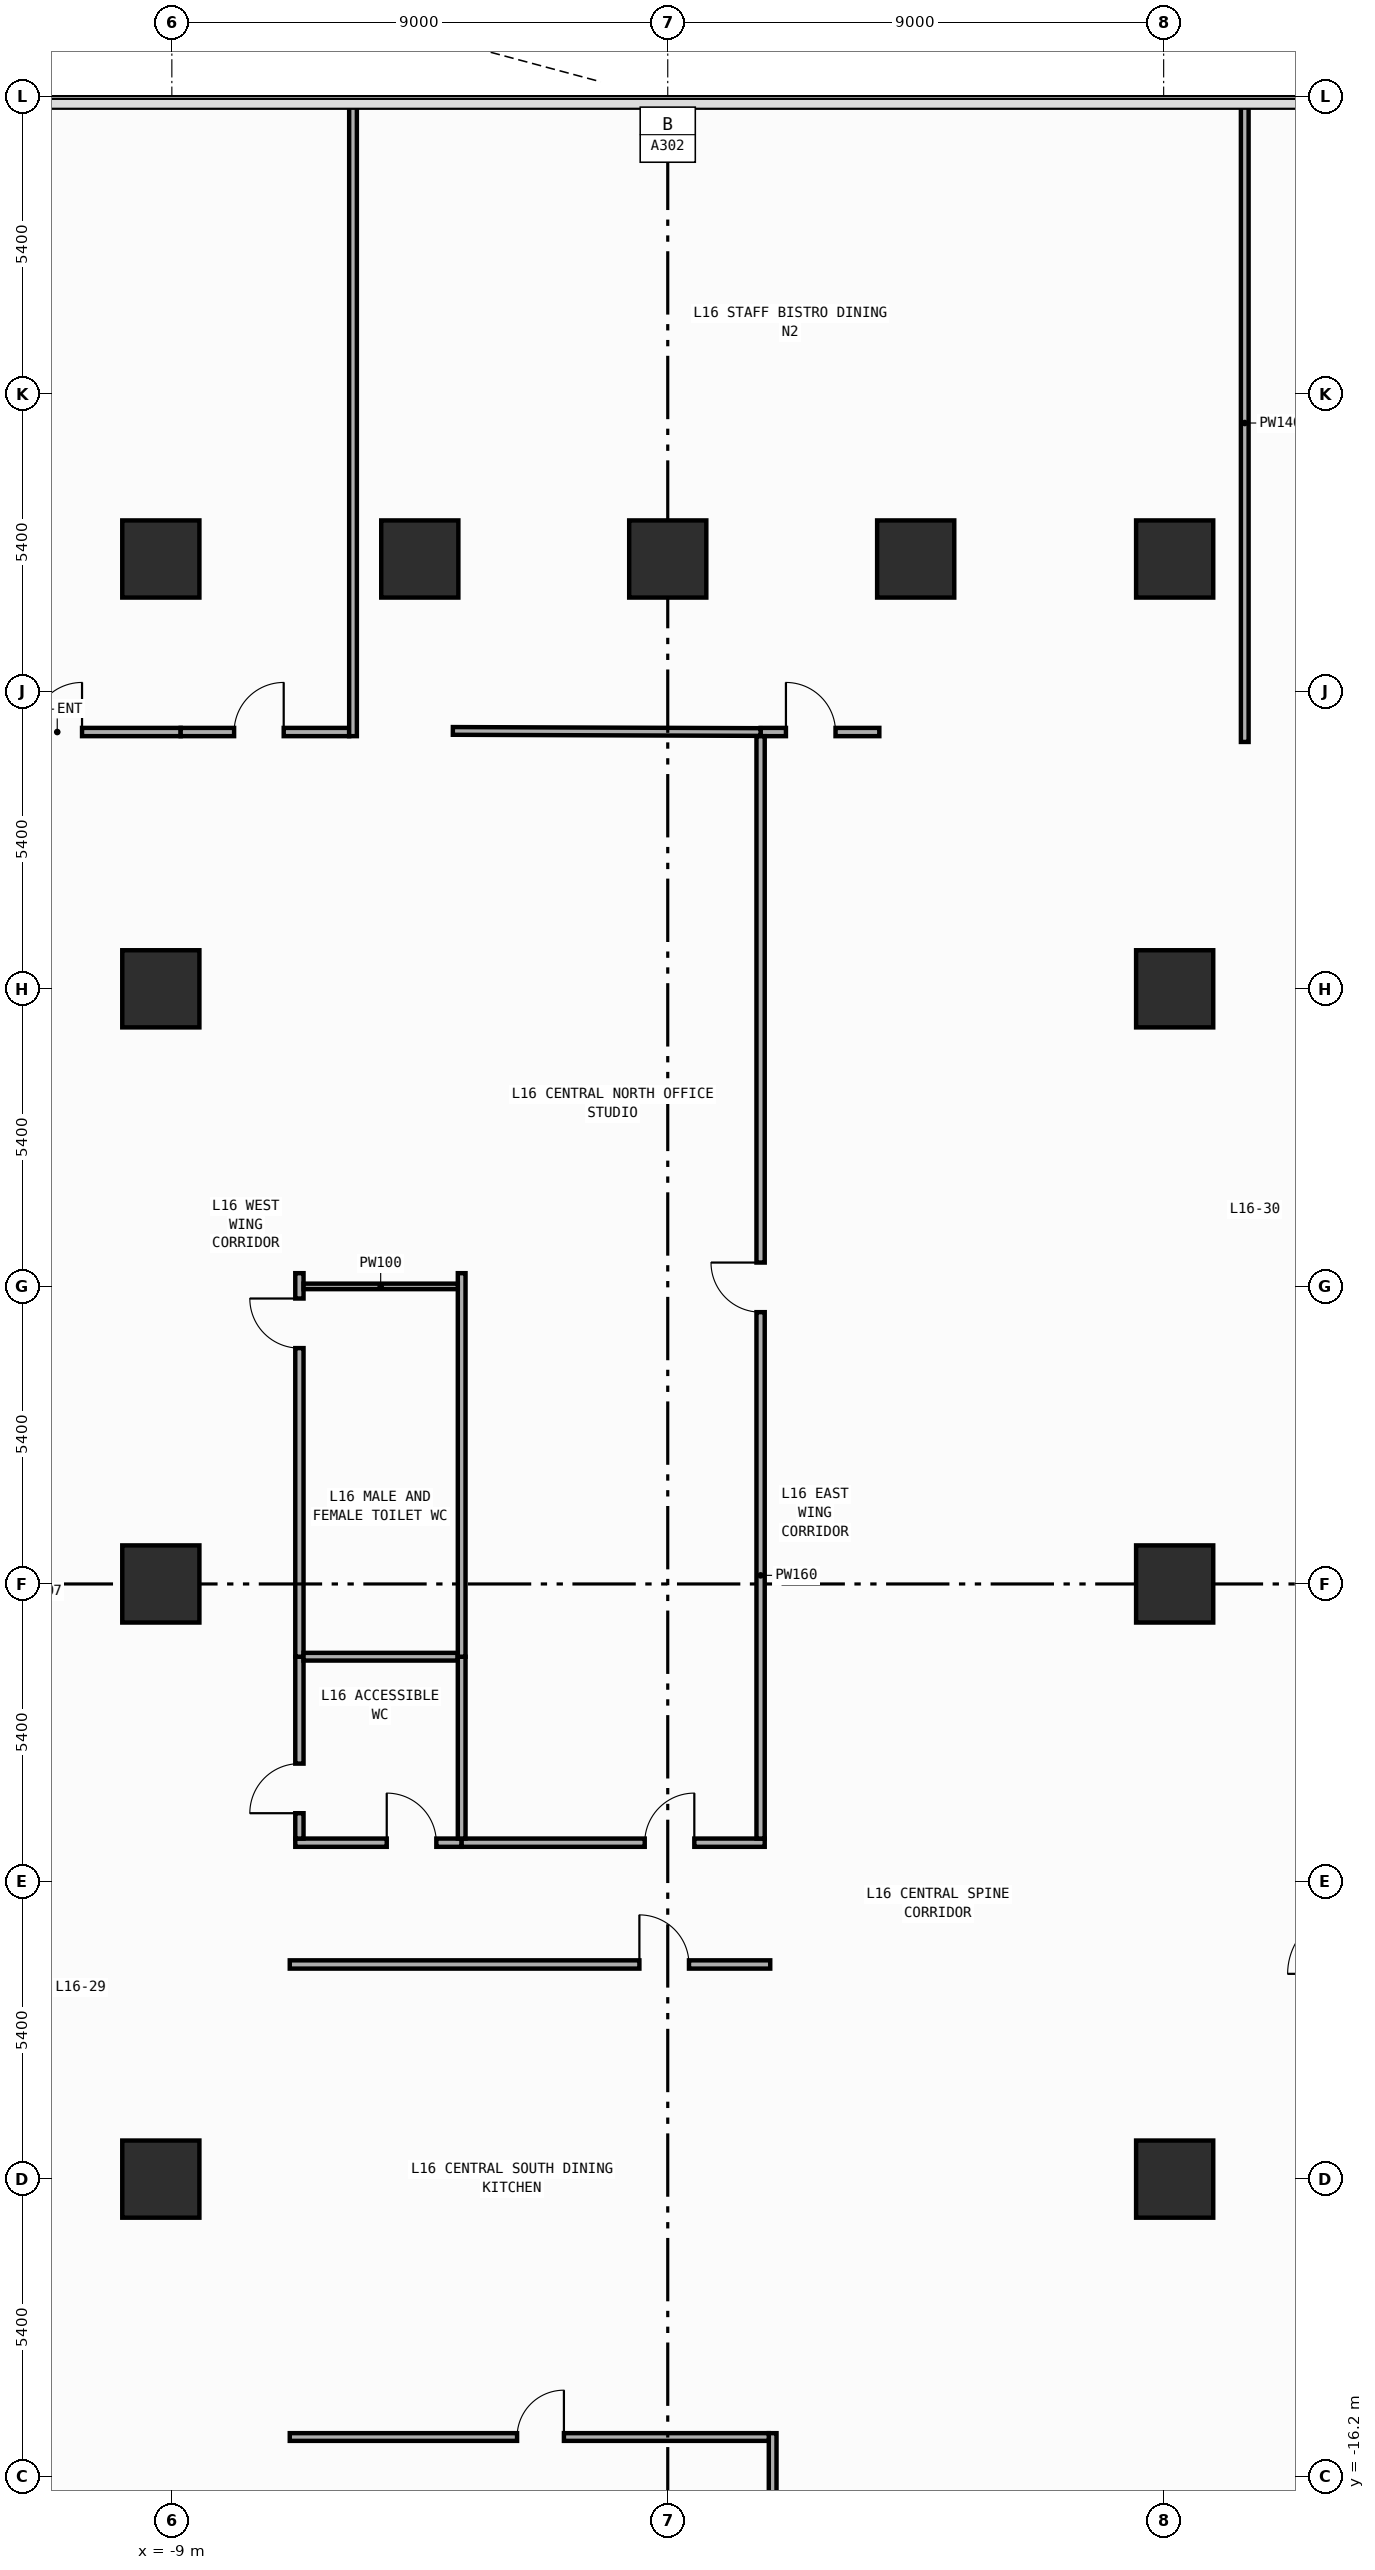
"""IFC4 building model, lengths in metres.
Left out: names, types, materials, properties, quantities, classifications, styles, units other than length and angle.
Written with IfcOpenShell. Run it as: python <this file> out.ifc"""

import sys

from ifc_helpers import new_model, si_unit, direction, frame, frame_2d, origin, origin_2d, place, context, subcontext, project, spatial, rectangle, extrude, element, fill, save


model = new_model("IFC4")
c1 = context("Model", 3, precision=1e-05, world=origin(), true_north=direction((0.0, 1.0)))
c2 = subcontext(c1, "Body", "Model", "MODEL_VIEW")
j1 = project(units=[si_unit("LENGTHUNIT", "METRE"), si_unit("PLANEANGLEUNIT", "RADIAN")], contexts=[c1])
p1 = place(None, origin())
s1 = spatial("IfcSite", under=j1, at=p1, CompositionType="ELEMENT")
p2 = place(p1, origin())
s2 = spatial("IfcBuilding", under=s1, at=p2, CompositionType="ELEMENT")
p3 = place(p2, frame((0.0, 0.0, 68.0)))
s3 = spatial("IfcBuildingStorey", under=s2, at=p3, CompositionType="ELEMENT", Elevation=68.0)
for number, where, z_axis, x_axis in (
    (1, (-9.2, -10.8, 0.0), (0.0, 0.0, 1.0), (1.0, 0.0, 0.0)),
    (2, (-9.2, 0.0, 0.0), (0.0, 0.0, 1.0), (1.0, 0.0, 0.0)),
    (3, (-9.2, 10.8, 0.0), (0.0, 0.0, 1.0), (1.0, 0.0, 0.0)),
    (4, (-9.2, 18.6, 0.0), (0.0, 0.0, 1.0), (1.0, 0.0, 0.0)),
    (5, (9.2, -10.8, 0.0), (0.0, 0.0, 1.0), (1.0, 0.0, 0.0)),
    (6, (9.2, 0.0, 0.0), (0.0, 0.0, 1.0), (1.0, 0.0, 0.0)),
    (7, (9.2, 10.8, 0.0), (0.0, 0.0, 1.0), (1.0, 0.0, 0.0)),
    (8, (9.2, 18.6, 0.0), (0.0, 0.0, 1.0), (1.0, 0.0, 0.0)),
    (9, (-4.5, 18.6, 0.0), (0.0, 0.0, 1.0), (1.0, 0.0, 0.0)),
    (10, (0.0, 18.6, 0.0), (0.0, 0.0, 1.0), (1.0, 0.0, 0.0)),
    (11, (4.5, 18.6, 0.0), (0.0, 0.0, 1.0), (1.0, 0.0, 0.0)),
):
    element("IfcColumn", number, at=place(p3, frame(where, z_axis=z_axis, x_axis=x_axis)), inside=s3, PredefinedType="COLUMN", context=c2, shape_type="SweptSolid", body=[
        extrude(rectangle(XDim=1.4, YDim=1.4, at=origin_2d()), origin(), (0.0, 0.0, 1.0), 4.2),
    ])
p4 = place(p3, frame((-11.99, 15.46, 0.0), z_axis=(0.0, 0.0, 1.0), x_axis=(1.0, 0.0, 0.0)))
e12 = element("IfcWall", 12, at=p4, inside=s3, PredefinedType="PARTITIONING", context=c2, shape_type="SweptSolid", body=[
    extrude(rectangle(XDim=3.15, YDim=0.15, at=frame_2d((1.575, 0.0))), origin(), (0.0, 0.0, 1.0), 3.94),
])
p5 = place(p4, frame((0.46, 0.0, 0.0)))
e13 = element("IfcOpeningElement", 13, at=p5, cuts=e12, PredefinedType="OPENING", context=c2, shape_type="SweptSolid", body=[
    extrude(rectangle(XDim=0.9, YDim=2.15, at=frame_2d((0.45, 1.075))), frame((0.0, 0.085, 0.0), z_axis=(0.0, -1.0, 0.0), x_axis=(1.0, 0.0, 0.0)), (0.0, 0.0, 1.0), 0.17),
])
p6 = place(p3, frame((-6.76, -4.695, 0.0), z_axis=(0.0, 0.0, 1.0), x_axis=(1.0, 0.0, 0.0)))
e14 = element("IfcWall", 14, at=p6, inside=s3, PredefinedType="PARTITIONING", context=c2, shape_type="SweptSolid", body=[
    extrude(rectangle(XDim=3.02, YDim=0.15, at=frame_2d((1.51, 0.0))), origin(), (0.0, 0.0, 1.0), 3.94),
])
p7 = place(p6, frame((1.66, 0.0, 0.0)))
e15 = element("IfcOpeningElement", 15, at=p7, cuts=e14, PredefinedType="OPENING", context=c2, shape_type="SweptSolid", body=[
    extrude(rectangle(XDim=0.9, YDim=2.15, at=frame_2d((0.45, 1.075))), frame((0.0, 0.085, 0.0), z_axis=(0.0, -1.0, 0.0), x_axis=(1.0, 0.0, 0.0)), (0.0, 0.0, 1.0), 0.17),
])
p8 = place(p3, frame((-3.74, -4.695, 0.0), z_axis=(0.0, 0.0, 1.0), x_axis=(1.0, 0.0, 0.0)))
e16 = element("IfcWall", 16, at=p8, inside=s3, PredefinedType="PARTITIONING", context=c2, shape_type="SweptSolid", body=[
    extrude(rectangle(XDim=5.5, YDim=0.15, at=frame_2d((2.75, 0.0))), origin(), (0.0, 0.0, 1.0), 3.94),
])
p9 = place(p8, frame((3.322, 0.0, 0.0)))
e17 = element("IfcOpeningElement", 17, at=p9, cuts=e16, PredefinedType="OPENING", context=c2, shape_type="SweptSolid", body=[
    extrude(rectangle(XDim=0.9, YDim=2.15, at=frame_2d((0.45, 1.075))), frame((0.0, 0.085, 0.0), z_axis=(0.0, -1.0, 0.0), x_axis=(1.0, 0.0, 0.0)), (0.0, 0.0, 1.0), 0.17),
])
p10 = place(p3, frame((-6.86, -6.905, 0.0), z_axis=(0.0, 0.0, 1.0), x_axis=(1.0, 0.0, 0.0)))
e18 = element("IfcWall", 18, at=p10, inside=s3, PredefinedType="PARTITIONING", context=c2, shape_type="SweptSolid", body=[
    extrude(rectangle(XDim=8.72, YDim=0.15, at=frame_2d((4.36, 0.0))), origin(), (0.0, 0.0, 1.0), 3.94),
])
p11 = place(p10, frame((6.345, 0.0, 0.0)))
e19 = element("IfcOpeningElement", 19, at=p11, cuts=e18, PredefinedType="OPENING", context=c2, shape_type="SweptSolid", body=[
    extrude(rectangle(XDim=0.9, YDim=2.15, at=frame_2d((0.45, 1.075))), frame((0.0, 0.085, 0.0), z_axis=(0.0, -1.0, 0.0), x_axis=(1.0, 0.0, 0.0)), (0.0, 0.0, 1.0), 0.17),
])
p12 = place(p3, frame((-8.84, 15.46, 0.0), z_axis=(0.0, 0.0, 1.0), x_axis=(1.0, 0.0, 0.0)))
e20 = element("IfcWall", 20, at=p12, inside=s3, PredefinedType="PARTITIONING", context=c2, shape_type="SweptSolid", body=[
    extrude(rectangle(XDim=3.058, YDim=0.15, at=frame_2d((1.529, 0.0))), origin(), (0.0, 0.0, 1.0), 3.94),
])
p13 = place(p12, frame((0.97, 0.0, 0.0)))
e21 = element("IfcOpeningElement", 21, at=p13, cuts=e20, PredefinedType="OPENING", context=c2, shape_type="SweptSolid", body=[
    extrude(rectangle(XDim=0.9, YDim=2.15, at=frame_2d((0.45, 1.075))), frame((0.0, 0.085, 0.0), z_axis=(0.0, -1.0, 0.0), x_axis=(1.0, 0.0, 0.0)), (0.0, 0.0, 1.0), 0.17),
])
p14 = place(p3, frame((-6.685, -4.62, 0.0), z_axis=(0.0, 0.0, 1.0), x_axis=(0.0, 1.0, 0.0)))
e22 = element("IfcWall", 22, at=p14, inside=s3, PredefinedType="PARTITIONING", context=c2, shape_type="SweptSolid", body=[
    extrude(rectangle(XDim=3.3, YDim=0.15, at=frame_2d((1.65, 0.0))), origin(), (0.0, 0.0, 1.0), 3.94),
])
p15 = place(p14, frame((0.46, 0.0, 0.0)))
e23 = element("IfcOpeningElement", 23, at=p15, cuts=e22, PredefinedType="OPENING", context=c2, shape_type="SweptSolid", body=[
    extrude(rectangle(XDim=0.9, YDim=2.15, at=frame_2d((0.45, 1.075))), frame((0.0, 0.085, 0.0), z_axis=(0.0, -1.0, 0.0), x_axis=(1.0, 0.0, 0.0)), (0.0, 0.0, 1.0), 0.17),
])
p16 = place(p3, frame((-6.685, -1.32, 0.0), z_axis=(0.0, 0.0, 1.0), x_axis=(0.0, 1.0, 0.0)))
e24 = element("IfcWall", 24, at=p16, inside=s3, PredefinedType="PARTITIONING", context=c2, shape_type="SweptSolid", body=[
    extrude(rectangle(XDim=6.96, YDim=0.15, at=frame_2d((3.48, 0.0))), origin(), (0.0, 0.0, 1.0), 3.94),
])
p17 = place(p16, frame((5.6, 0.0, 0.0)))
e25 = element("IfcOpeningElement", 25, at=p17, cuts=e24, PredefinedType="OPENING", context=c2, shape_type="SweptSolid", body=[
    extrude(rectangle(XDim=0.9, YDim=2.15, at=frame_2d((0.45, 1.075))), frame((0.0, 0.085, 0.0), z_axis=(0.0, -1.0, 0.0), x_axis=(1.0, 0.0, 0.0)), (0.0, 0.0, 1.0), 0.17),
])
p18 = place(p3, frame((1.685, 15.46, 0.0), z_axis=(0.0, 0.0, 1.0), x_axis=(1.0, 0.0, 0.0)))
e26 = element("IfcWall", 26, at=p18, inside=s3, PredefinedType="PARTITIONING", context=c2, shape_type="SweptSolid", body=[
    extrude(rectangle(XDim=2.155, YDim=0.15, at=frame_2d((1.078, 0.0))), origin(), (0.0, 0.0, 1.0), 3.94),
])
p19 = place(p18, frame((0.46, 0.0, 0.0)))
e27 = element("IfcOpeningElement", 27, at=p19, cuts=e26, PredefinedType="OPENING", context=c2, shape_type="SweptSolid", body=[
    extrude(rectangle(XDim=0.9, YDim=2.15, at=frame_2d((0.45, 1.075))), frame((0.0, 0.085, 0.0), z_axis=(0.0, -1.0, 0.0), x_axis=(1.0, 0.0, 0.0)), (0.0, 0.0, 1.0), 0.17),
])
p20 = place(p3, frame((1.685, -4.62, 0.0), z_axis=(0.0, 0.0, 1.0), x_axis=(0.0, 1.0, 0.0)))
e28 = element("IfcWall", 28, at=p20, inside=s3, PredefinedType="PARTITIONING", context=c2, shape_type="SweptSolid", body=[
    extrude(rectangle(XDim=20.005, YDim=0.15, at=frame_2d((10.002, 0.0))), origin(), (0.0, 0.0, 1.0), 3.94),
])
p21 = place(p20, frame((9.552, 0.0, 0.0)))
e29 = element("IfcOpeningElement", 29, at=p21, cuts=e28, PredefinedType="OPENING", context=c2, shape_type="SweptSolid", body=[
    extrude(rectangle(XDim=0.9, YDim=2.15, at=frame_2d((0.45, 1.075))), frame((0.0, 0.085, 0.0), z_axis=(0.0, -1.0, 0.0), x_axis=(1.0, 0.0, 0.0)), (0.0, 0.0, 1.0), 0.17),
])
p22 = place(p3, frame((-5.712, 15.385, 0.0), z_axis=(0.0, 0.0, 1.0), x_axis=(0.0, 1.0, 0.0)))
e30 = element("IfcWall", 30, at=p22, inside=s3, PredefinedType="PARTITIONING", context=c2, shape_type="SweptSolid", body=[
    extrude(rectangle(XDim=11.47, YDim=0.14, at=frame_2d((5.735, 0.0))), origin(), (0.0, 0.0, 1.0), 3.94),
])
p23 = place(p3, frame((10.472, 15.28, 0.0), z_axis=(0.0, 0.0, 1.0), x_axis=(0.0, 1.0, 0.0)))
e31 = element("IfcWall", 31, at=p23, inside=s3, PredefinedType="PARTITIONING", context=c2, shape_type="SweptSolid", body=[
    extrude(rectangle(XDim=11.575, YDim=0.14, at=frame_2d((5.788, 0.0))), origin(), (0.0, 0.0, 1.0), 3.94),
])
p24 = place(p3, frame((-3.9, 15.48, 0.0), z_axis=(0.0, 0.0, 1.0), x_axis=(0.999993575589, -0.003584519724, 0.0)))
e32 = element("IfcWall", 32, at=p24, inside=s3, PredefinedType="PARTITIONING", context=c2, shape_type="SweptSolid", body=[
    extrude(rectangle(XDim=5.585, YDim=0.14, at=frame_2d((2.792, 0.0))), origin(), (0.0, 0.0, 1.0), 3.94),
])
p25 = place(p3, frame((1.904, -26.756, 0.0), z_axis=(0.0, 0.0, 1.0), x_axis=(0.0, 1.0, 0.0)))
e33 = element("IfcWall", 33, at=p25, inside=s3, PredefinedType="PARTITIONING", context=c2, shape_type="SweptSolid", body=[
    extrude(rectangle(XDim=11.346, YDim=0.14, at=frame_2d((5.673, 0.0))), origin(), (0.0, 0.0, 1.0), 3.94),
])
p26 = place(p25, frame((0.46, 0.0, 0.0)))
e34 = element("IfcOpeningElement", 34, at=p26, cuts=e33, PredefinedType="OPENING", context=c2, shape_type="SweptSolid", body=[
    extrude(rectangle(XDim=0.85, YDim=2.1, at=frame_2d((0.425, 1.05))), frame((0.0, 0.08, 0.0), z_axis=(0.0, -1.0, 0.0), x_axis=(1.0, 0.0, 0.0)), (0.0, 0.0, 1.0), 0.16),
])
p27 = place(p3, frame((-6.86, -15.48, 0.0), z_axis=(0.0, 0.0, 1.0), x_axis=(1.0, 0.0, 0.0)))
e35 = element("IfcWall", 35, at=p27, inside=s3, PredefinedType="PARTITIONING", context=c2, shape_type="SweptSolid", body=[
    extrude(rectangle(XDim=8.694, YDim=0.14, at=frame_2d((4.347, 0.0))), origin(), (0.0, 0.0, 1.0), 3.94),
])
p28 = place(p27, frame((4.125, 0.0, 0.0)))
e36 = element("IfcOpeningElement", 36, at=p28, cuts=e35, PredefinedType="OPENING", context=c2, shape_type="SweptSolid", body=[
    extrude(rectangle(XDim=0.85, YDim=2.1, at=frame_2d((0.425, 1.05))), frame((0.0, 0.08, 0.0), z_axis=(0.0, -1.0, 0.0), x_axis=(1.0, 0.0, 0.0)), (0.0, 0.0, 1.0), 0.16),
])
p29 = place(p3, frame((-6.61, -1.32, 0.0), z_axis=(0.0, 0.0, 1.0), x_axis=(1.0, 0.0, 0.0)))
e37 = element("IfcWall", 37, at=p29, inside=s3, PredefinedType="PARTITIONING", context=c2, shape_type="SweptSolid", body=[
    extrude(rectangle(XDim=2.8, YDim=0.14, at=frame_2d((1.4, 0.0))), origin(), (0.0, 0.0, 1.0), 3.94),
])
p30 = place(p3, frame((-3.74, -4.62, 0.0), z_axis=(0.0, 0.0, 1.0), x_axis=(0.0, 1.0, 0.0)))
e38 = element("IfcWall", 38, at=p30, inside=s3, PredefinedType="PARTITIONING", context=c2, shape_type="SweptSolid", body=[
    extrude(rectangle(XDim=3.3, YDim=0.14, at=frame_2d((1.65, 0.0))), origin(), (0.0, 0.0, 1.0), 3.94),
])
p31 = place(p3, frame((-3.74, -1.32, 0.0), z_axis=(0.0, 0.0, 1.0), x_axis=(0.0, 1.0, 0.0)))
e39 = element("IfcWall", 39, at=p31, inside=s3, PredefinedType="PARTITIONING", context=c2, shape_type="SweptSolid", body=[
    extrude(rectangle(XDim=6.96, YDim=0.14, at=frame_2d((3.48, 0.0))), origin(), (0.0, 0.0, 1.0), 3.94),
])
p32 = place(p3, frame((-6.61, 5.4, 0.0), z_axis=(0.0, 0.0, 1.0), x_axis=(1.0, 0.0, 0.0)))
e40 = element("IfcWall", 40, at=p32, inside=s3, PredefinedType="PARTITIONING", context=c2, shape_type="SweptSolid", body=[
    extrude(rectangle(XDim=2.8, YDim=0.1, at=frame_2d((1.4, 0.0))), origin(), (0.0, 0.0, 1.0), 3.94),
])
p33 = place(p5, origin())
e41 = element("IfcDoor", 41, at=p33, inside=s3, OperationType="SINGLE_SWING_RIGHT", PredefinedType="DOOR", context=c2, shape_type="SweptSolid", body=[
    extrude(rectangle(XDim=0.9, YDim=2.15, at=frame_2d((0.45, 1.075))), frame((0.0, 0.025, 0.0), z_axis=(0.0, -1.0, 0.0), x_axis=(1.0, 0.0, 0.0)), (0.0, 0.0, 1.0), 0.05),
])
fill(e13, e41)
p34 = place(p7, origin())
e42 = element("IfcDoor", 42, at=p34, inside=s3, OperationType="SINGLE_SWING_LEFT", PredefinedType="DOOR", context=c2, shape_type="SweptSolid", body=[
    extrude(rectangle(XDim=0.9, YDim=2.15, at=frame_2d((0.45, 1.075))), frame((0.0, 0.025, 0.0), z_axis=(0.0, -1.0, 0.0), x_axis=(1.0, 0.0, 0.0)), (0.0, 0.0, 1.0), 0.05),
])
fill(e15, e42)
p35 = place(p9, origin())
e43 = element("IfcDoor", 43, at=p35, inside=s3, OperationType="SINGLE_SWING_RIGHT", PredefinedType="DOOR", context=c2, shape_type="SweptSolid", body=[
    extrude(rectangle(XDim=0.9, YDim=2.15, at=frame_2d((0.45, 1.075))), frame((0.0, 0.025, 0.0), z_axis=(0.0, -1.0, 0.0), x_axis=(1.0, 0.0, 0.0)), (0.0, 0.0, 1.0), 0.05),
])
fill(e17, e43)
p36 = place(p11, origin())
e44 = element("IfcDoor", 44, at=p36, inside=s3, OperationType="SINGLE_SWING_LEFT", PredefinedType="DOOR", context=c2, shape_type="SweptSolid", body=[
    extrude(rectangle(XDim=0.9, YDim=2.15, at=frame_2d((0.45, 1.075))), frame((0.0, 0.025, 0.0), z_axis=(0.0, -1.0, 0.0), x_axis=(1.0, 0.0, 0.0)), (0.0, 0.0, 1.0), 0.05),
])
fill(e19, e44)
p37 = place(p13, origin())
e45 = element("IfcDoor", 45, at=p37, inside=s3, OperationType="SINGLE_SWING_RIGHT", PredefinedType="DOOR", context=c2, shape_type="SweptSolid", body=[
    extrude(rectangle(XDim=0.9, YDim=2.15, at=frame_2d((0.45, 1.075))), frame((0.0, 0.025, 0.0), z_axis=(0.0, -1.0, 0.0), x_axis=(1.0, 0.0, 0.0)), (0.0, 0.0, 1.0), 0.05),
])
fill(e21, e45)
p38 = place(p15, origin())
e46 = element("IfcDoor", 46, at=p38, inside=s3, OperationType="SINGLE_SWING_LEFT", PredefinedType="DOOR", context=c2, shape_type="SweptSolid", body=[
    extrude(rectangle(XDim=0.9, YDim=2.15, at=frame_2d((0.45, 1.075))), frame((0.0, 0.025, 0.0), z_axis=(0.0, -1.0, 0.0), x_axis=(1.0, 0.0, 0.0)), (0.0, 0.0, 1.0), 0.05),
])
fill(e23, e46)
p39 = place(p17, origin())
e47 = element("IfcDoor", 47, at=p39, inside=s3, OperationType="SINGLE_SWING_RIGHT", PredefinedType="DOOR", context=c2, shape_type="SweptSolid", body=[
    extrude(rectangle(XDim=0.9, YDim=2.15, at=frame_2d((0.45, 1.075))), frame((0.0, 0.025, 0.0), z_axis=(0.0, -1.0, 0.0), x_axis=(1.0, 0.0, 0.0)), (0.0, 0.0, 1.0), 0.05),
])
fill(e25, e47)
p40 = place(p19, origin())
e48 = element("IfcDoor", 48, at=p40, inside=s3, OperationType="SINGLE_SWING_LEFT", PredefinedType="DOOR", context=c2, shape_type="SweptSolid", body=[
    extrude(rectangle(XDim=0.9, YDim=2.15, at=frame_2d((0.45, 1.075))), frame((0.0, 0.025, 0.0), z_axis=(0.0, -1.0, 0.0), x_axis=(1.0, 0.0, 0.0)), (0.0, 0.0, 1.0), 0.05),
])
fill(e27, e48)
p41 = place(p21, origin())
e49 = element("IfcDoor", 49, at=p41, inside=s3, OperationType="SINGLE_SWING_RIGHT", PredefinedType="DOOR", context=c2, shape_type="SweptSolid", body=[
    extrude(rectangle(XDim=0.9, YDim=2.15, at=frame_2d((0.45, 1.075))), frame((0.0, 0.025, 0.0), z_axis=(0.0, -1.0, 0.0), x_axis=(1.0, 0.0, 0.0)), (0.0, 0.0, 1.0), 0.05),
])
fill(e29, e49)
p42 = place(p28, origin())
e50 = element("IfcDoor", 50, at=p42, inside=s3, OperationType="SINGLE_SWING_RIGHT", PredefinedType="DOOR", context=c2, shape_type="SweptSolid", body=[
    extrude(rectangle(XDim=0.85, YDim=2.1, at=frame_2d((0.425, 1.05))), frame((0.0, 0.025, 0.0), z_axis=(0.0, -1.0, 0.0), x_axis=(1.0, 0.0, 0.0)), (0.0, 0.0, 1.0), 0.05),
])
fill(e36, e50)
save(model, sys.argv[1])
